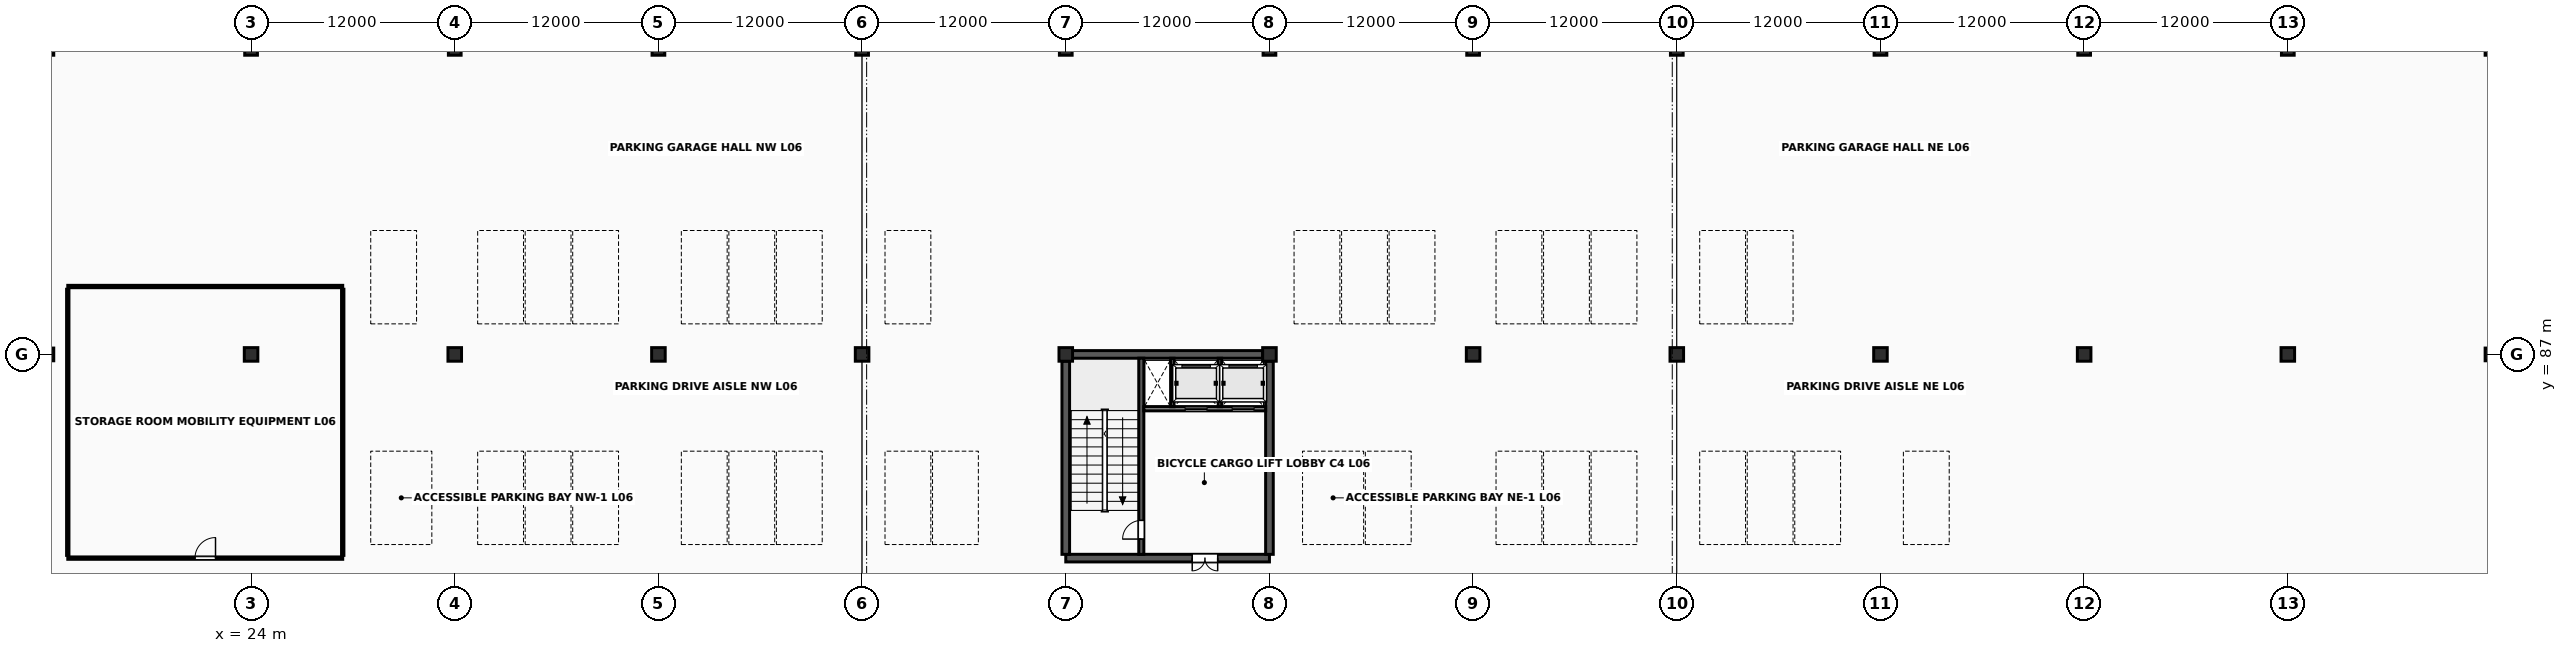
"""IFC4 building model, lengths in metres.
Left out: names, types, materials, properties, quantities, classifications, styles, units other than length and angle.
Written with IfcOpenShell. Run it as: python <this file> out.ifc"""

import sys

from ifc_helpers import new_model, si_unit, direction, frame, frame_2d, origin, origin_2d, place, context, subcontext, project, spatial, rectangle, extrude, element, fill, save


model = new_model("IFC4")
c1 = context("Model", 3, precision=1e-05, world=origin(), true_north=direction((0.0, 1.0)))
c2 = subcontext(c1, "Body", "Model", "MODEL_VIEW")
j1 = project(units=[si_unit("LENGTHUNIT", "METRE"), si_unit("PLANEANGLEUNIT", "RADIAN")], contexts=[c1])
p1 = place(None, origin())
s1 = spatial("IfcSite", under=j1, at=p1, CompositionType="ELEMENT")
p2 = place(p1, origin())
s2 = spatial("IfcBuilding", under=s1, at=p2, CompositionType="ELEMENT")
p3 = place(p2, frame((0.0, 0.0, 24.8)))
s3 = spatial("IfcBuildingStorey", under=s2, at=p3, CompositionType="ELEMENT", Elevation=24.8)
for number, where, z_axis, x_axis in (
    (1, (12.0, 87.0, 0.0), (0.0, 0.0, 1.0), (1.0, 0.0, 0.0)),
    (2, (12.0, 105.0, 0.0), (0.0, 0.0, 1.0), (1.0, 0.0, 0.0)),
):
    element("IfcColumn", number, at=place(p3, frame(where, z_axis=z_axis, x_axis=x_axis)), inside=s3, PredefinedType="COLUMN", context=c2, shape_type="SweptSolid", body=[
        extrude(rectangle(XDim=0.75, YDim=0.75, at=origin_2d()), origin(), (0.0, 0.0, 1.0), 3.8),
    ])
p4 = place(p3, frame((24.0, 87.0, 0.0), z_axis=(0.0, 0.0, 1.0), x_axis=(1.0, 0.0, 0.0)))
e3 = element("IfcColumn", 3, at=p4, inside=s3, PredefinedType="COLUMN", context=c2, shape_type="SweptSolid", body=[
    extrude(rectangle(XDim=0.8, YDim=0.8, at=origin_2d()), origin(), (0.0, 0.0, 1.0), 3.8),
])
p5 = place(p3, frame((24.0, 105.0, 0.0), z_axis=(0.0, 0.0, 1.0), x_axis=(1.0, 0.0, 0.0)))
e4 = element("IfcColumn", 4, at=p5, inside=s3, PredefinedType="COLUMN", context=c2, shape_type="SweptSolid", body=[
    extrude(rectangle(XDim=0.75, YDim=0.75, at=origin_2d()), origin(), (0.0, 0.0, 1.0), 3.8),
])
p6 = place(p3, frame((36.0, 87.0, 0.0), z_axis=(0.0, 0.0, 1.0), x_axis=(1.0, 0.0, 0.0)))
e5 = element("IfcColumn", 5, at=p6, inside=s3, PredefinedType="COLUMN", context=c2, shape_type="SweptSolid", body=[
    extrude(rectangle(XDim=0.8, YDim=0.8, at=origin_2d()), origin(), (0.0, 0.0, 1.0), 3.8),
])
p7 = place(p3, frame((36.0, 105.0, 0.0), z_axis=(0.0, 0.0, 1.0), x_axis=(1.0, 0.0, 0.0)))
e6 = element("IfcColumn", 6, at=p7, inside=s3, PredefinedType="COLUMN", context=c2, shape_type="SweptSolid", body=[
    extrude(rectangle(XDim=0.75, YDim=0.75, at=origin_2d()), origin(), (0.0, 0.0, 1.0), 3.8),
])
p8 = place(p3, frame((48.0, 87.0, 0.0), z_axis=(0.0, 0.0, 1.0), x_axis=(1.0, 0.0, 0.0)))
e7 = element("IfcColumn", 7, at=p8, inside=s3, PredefinedType="COLUMN", context=c2, shape_type="SweptSolid", body=[
    extrude(rectangle(XDim=0.8, YDim=0.8, at=origin_2d()), origin(), (0.0, 0.0, 1.0), 3.8),
])
p9 = place(p3, frame((48.0, 105.0, 0.0), z_axis=(0.0, 0.0, 1.0), x_axis=(1.0, 0.0, 0.0)))
e8 = element("IfcColumn", 8, at=p9, inside=s3, PredefinedType="COLUMN", context=c2, shape_type="SweptSolid", body=[
    extrude(rectangle(XDim=0.75, YDim=0.75, at=origin_2d()), origin(), (0.0, 0.0, 1.0), 3.8),
])
p10 = place(p3, frame((60.0, 87.0, 0.0), z_axis=(0.0, 0.0, 1.0), x_axis=(1.0, 0.0, 0.0)))
e9 = element("IfcColumn", 9, at=p10, inside=s3, PredefinedType="COLUMN", context=c2, shape_type="SweptSolid", body=[
    extrude(rectangle(XDim=0.8, YDim=0.8, at=origin_2d()), origin(), (0.0, 0.0, 1.0), 3.8),
])
p11 = place(p3, frame((60.0, 105.0, 0.0), z_axis=(0.0, 0.0, 1.0), x_axis=(1.0, 0.0, 0.0)))
e10 = element("IfcColumn", 10, at=p11, inside=s3, PredefinedType="COLUMN", context=c2, shape_type="SweptSolid", body=[
    extrude(rectangle(XDim=0.75, YDim=0.75, at=origin_2d()), origin(), (0.0, 0.0, 1.0), 3.8),
])
p12 = place(p3, frame((72.0, 87.0, 0.0), z_axis=(0.0, 0.0, 1.0), x_axis=(1.0, 0.0, 0.0)))
e11 = element("IfcColumn", 11, at=p12, inside=s3, PredefinedType="COLUMN", context=c2, shape_type="SweptSolid", body=[
    extrude(rectangle(XDim=0.8, YDim=0.8, at=origin_2d()), origin(), (0.0, 0.0, 1.0), 3.8),
])
p13 = place(p3, frame((72.0, 105.0, 0.0), z_axis=(0.0, 0.0, 1.0), x_axis=(1.0, 0.0, 0.0)))
e12 = element("IfcColumn", 12, at=p13, inside=s3, PredefinedType="COLUMN", context=c2, shape_type="SweptSolid", body=[
    extrude(rectangle(XDim=0.75, YDim=0.75, at=origin_2d()), origin(), (0.0, 0.0, 1.0), 3.8),
])
p14 = place(p3, frame((84.0, 87.0, 0.0), z_axis=(0.0, 0.0, 1.0), x_axis=(1.0, 0.0, 0.0)))
e13 = element("IfcColumn", 13, at=p14, inside=s3, PredefinedType="COLUMN", context=c2, shape_type="SweptSolid", body=[
    extrude(rectangle(XDim=0.8, YDim=0.8, at=origin_2d()), origin(), (0.0, 0.0, 1.0), 3.8),
])
p15 = place(p3, frame((84.0, 105.0, 0.0), z_axis=(0.0, 0.0, 1.0), x_axis=(1.0, 0.0, 0.0)))
e14 = element("IfcColumn", 14, at=p15, inside=s3, PredefinedType="COLUMN", context=c2, shape_type="SweptSolid", body=[
    extrude(rectangle(XDim=0.75, YDim=0.75, at=origin_2d()), origin(), (0.0, 0.0, 1.0), 3.8),
])
p16 = place(p3, frame((96.0, 87.0, 0.0), z_axis=(0.0, 0.0, 1.0), x_axis=(1.0, 0.0, 0.0)))
e15 = element("IfcColumn", 15, at=p16, inside=s3, PredefinedType="COLUMN", context=c2, shape_type="SweptSolid", body=[
    extrude(rectangle(XDim=0.8, YDim=0.8, at=origin_2d()), origin(), (0.0, 0.0, 1.0), 3.8),
])
p17 = place(p3, frame((96.0, 105.0, 0.0), z_axis=(0.0, 0.0, 1.0), x_axis=(1.0, 0.0, 0.0)))
e16 = element("IfcColumn", 16, at=p17, inside=s3, PredefinedType="COLUMN", context=c2, shape_type="SweptSolid", body=[
    extrude(rectangle(XDim=0.75, YDim=0.75, at=origin_2d()), origin(), (0.0, 0.0, 1.0), 3.8),
])
p18 = place(p3, frame((108.0, 87.0, 0.0), z_axis=(0.0, 0.0, 1.0), x_axis=(1.0, 0.0, 0.0)))
e17 = element("IfcColumn", 17, at=p18, inside=s3, PredefinedType="COLUMN", context=c2, shape_type="SweptSolid", body=[
    extrude(rectangle(XDim=0.8, YDim=0.8, at=origin_2d()), origin(), (0.0, 0.0, 1.0), 3.8),
])
p19 = place(p3, frame((108.0, 105.0, 0.0), z_axis=(0.0, 0.0, 1.0), x_axis=(1.0, 0.0, 0.0)))
e18 = element("IfcColumn", 18, at=p19, inside=s3, PredefinedType="COLUMN", context=c2, shape_type="SweptSolid", body=[
    extrude(rectangle(XDim=0.75, YDim=0.75, at=origin_2d()), origin(), (0.0, 0.0, 1.0), 3.8),
])
p20 = place(p3, frame((120.0, 87.0, 0.0), z_axis=(0.0, 0.0, 1.0), x_axis=(1.0, 0.0, 0.0)))
e19 = element("IfcColumn", 19, at=p20, inside=s3, PredefinedType="COLUMN", context=c2, shape_type="SweptSolid", body=[
    extrude(rectangle(XDim=0.8, YDim=0.8, at=origin_2d()), origin(), (0.0, 0.0, 1.0), 3.8),
])
p21 = place(p3, frame((120.0, 105.0, 0.0), z_axis=(0.0, 0.0, 1.0), x_axis=(1.0, 0.0, 0.0)))
e20 = element("IfcColumn", 20, at=p21, inside=s3, PredefinedType="COLUMN", context=c2, shape_type="SweptSolid", body=[
    extrude(rectangle(XDim=0.75, YDim=0.75, at=origin_2d()), origin(), (0.0, 0.0, 1.0), 3.8),
])
p22 = place(p3, frame((132.0, 87.0, 0.0), z_axis=(0.0, 0.0, 1.0), x_axis=(1.0, 0.0, 0.0)))
e21 = element("IfcColumn", 21, at=p22, inside=s3, PredefinedType="COLUMN", context=c2, shape_type="SweptSolid", body=[
    extrude(rectangle(XDim=0.8, YDim=0.8, at=origin_2d()), origin(), (0.0, 0.0, 1.0), 3.8),
])
p23 = place(p3, frame((132.0, 105.0, 0.0), z_axis=(0.0, 0.0, 1.0), x_axis=(1.0, 0.0, 0.0)))
e22 = element("IfcColumn", 22, at=p23, inside=s3, PredefinedType="COLUMN", context=c2, shape_type="SweptSolid", body=[
    extrude(rectangle(XDim=0.75, YDim=0.75, at=origin_2d()), origin(), (0.0, 0.0, 1.0), 3.8),
])
p24 = place(p3, frame((144.0, 87.0, 0.0), z_axis=(0.0, 0.0, 1.0), x_axis=(1.0, 0.0, 0.0)))
e23 = element("IfcColumn", 23, at=p24, inside=s3, PredefinedType="COLUMN", context=c2, shape_type="SweptSolid", body=[
    extrude(rectangle(XDim=0.8, YDim=0.8, at=origin_2d()), origin(), (0.0, 0.0, 1.0), 3.8),
])
for number, where, z_axis, x_axis in (
    (24, (144.0, 105.0, 0.0), (0.0, 0.0, 1.0), (1.0, 0.0, 0.0)),
    (25, (156.0, 87.0, 0.0), (0.0, 0.0, 1.0), (1.0, 0.0, 0.0)),
    (26, (156.0, 105.0, 0.0), (0.0, 0.0, 1.0), (1.0, 0.0, 0.0)),
):
    element("IfcColumn", number, at=place(p3, frame(where, z_axis=z_axis, x_axis=x_axis)), inside=s3, PredefinedType="COLUMN", context=c2, shape_type="SweptSolid", body=[
        extrude(rectangle(XDim=0.75, YDim=0.75, at=origin_2d()), origin(), (0.0, 0.0, 1.0), 3.8),
    ])
p25 = place(p3, frame((72.0, 75.0, 0.0), z_axis=(0.0, 0.0, 1.0), x_axis=(1.0, 0.0, 0.0)))
e27 = element("IfcWall", 27, at=p25, inside=s3, PredefinedType="SHEAR", context=c2, shape_type="SweptSolid", body=[
    extrude(rectangle(XDim=12.0, YDim=0.45, at=frame_2d((6.0, 0.0))), origin(), (0.0, 0.0, 1.0), 3.628),
])
p26 = place(p25, frame((7.45, 0.0, 0.0)))
e28 = element("IfcOpeningElement", 28, at=p26, cuts=e27, PredefinedType="OPENING", context=c2, shape_type="SweptSolid", body=[
    extrude(rectangle(XDim=1.5, YDim=2.25, at=frame_2d((0.75, 1.125))), frame((0.0, 0.24, 0.0), z_axis=(0.0, -1.0, 0.0), x_axis=(1.0, 0.0, 0.0)), (0.0, 0.0, 1.0), 0.48),
])
p27 = place(p3, frame((72.397, 87.0, 0.0), z_axis=(0.0, 0.0, 1.0), x_axis=(1.0, 0.0, 0.0)))
e29 = element("IfcWall", 29, at=p27, inside=s3, PredefinedType="SHEAR", context=c2, shape_type="SweptSolid", body=[
    extrude(rectangle(XDim=11.206, YDim=0.45, at=frame_2d((5.603, 0.0))), origin(), (0.0, 0.0, 1.0), 3.628),
])
for number, where, z_axis, x_axis in (
    (30, (72.0, 75.222, 0.0), (0.0, 0.0, 1.0), (0.0, 1.0, 0.0)),
    (31, (84.0, 75.222, 0.0), (0.0, 0.0, 1.0), (0.0, 1.0, 0.0)),
):
    element("IfcWall", number, at=place(p3, frame(where, z_axis=z_axis, x_axis=x_axis)), inside=s3, PredefinedType="SHEAR", context=c2, shape_type="SweptSolid", body=[
        extrude(rectangle(XDim=11.381, YDim=0.45, at=frame_2d((5.69, 0.0))), origin(), (0.0, 0.0, 1.0), 3.628),
    ])
p28 = place(p3, frame((76.45, 75.222, 0.0), z_axis=(0.0, 0.0, 1.0), x_axis=(0.0, 1.0, 0.0)))
e32 = element("IfcWall", 32, at=p28, inside=s3, PredefinedType="SHEAR", context=c2, shape_type="SweptSolid", body=[
    extrude(rectangle(XDim=11.556, YDim=0.3, at=frame_2d((5.778, 0.0))), origin(), (0.0, 0.0, 1.0), 3.628),
])
p29 = place(p28, frame((0.9, 0.0, 0.0)))
e33 = element("IfcOpeningElement", 33, at=p29, cuts=e32, PredefinedType="OPENING", context=c2, shape_type="SweptSolid", body=[
    extrude(rectangle(XDim=1.1, YDim=2.2, at=frame_2d((0.55, 1.1))), frame((0.0, 0.165, 0.0), z_axis=(0.0, -1.0, 0.0), x_axis=(1.0, 0.0, 0.0)), (0.0, 0.0, 1.0), 0.33),
])
p30 = place(p3, frame((76.597, 83.8, 0.0), z_axis=(0.0, 0.0, 1.0), x_axis=(1.0, 0.0, 0.0)))
e34 = element("IfcWall", 34, at=p30, inside=s3, PredefinedType="SOLIDWALL", context=c2, shape_type="SweptSolid", body=[
    extrude(rectangle(XDim=7.181, YDim=0.25, at=frame_2d((3.591, 0.0))), origin(), (0.0, 0.0, 1.0), 3.628),
])
p31 = place(p30, frame((2.433, 0.0, 0.0)))
e35 = element("IfcOpeningElement", 35, at=p31, cuts=e34, PredefinedType="OPENING", context=c2, shape_type="SweptSolid", body=[
    extrude(rectangle(XDim=1.3, YDim=2.28, at=frame_2d((0.65, 1.14))), frame((0.0, 0.14, 0.0), z_axis=(0.0, -1.0, 0.0), x_axis=(1.0, 0.0, 0.0)), (0.0, 0.0, 1.0), 0.28),
])
p32 = place(p30, frame((5.203, 0.0, 0.0)))
e36 = element("IfcOpeningElement", 36, at=p32, cuts=e34, PredefinedType="OPENING", context=c2, shape_type="SweptSolid", body=[
    extrude(rectangle(XDim=1.3, YDim=2.28, at=frame_2d((0.65, 1.14))), frame((0.0, 0.14, 0.0), z_axis=(0.0, -1.0, 0.0), x_axis=(1.0, 0.0, 0.0)), (0.0, 0.0, 1.0), 0.28),
])
for number, where, z_axis, x_axis in (
    (37, (78.28, 83.92, 0.0), (0.0, 0.0, 1.0), (0.0, 1.0, 0.0)),
    (38, (81.08, 83.92, 0.0), (0.0, 0.0, 1.0), (0.0, 1.0, 0.0)),
):
    element("IfcWall", number, at=place(p3, frame(where, z_axis=z_axis, x_axis=x_axis)), inside=s3, PredefinedType="SOLIDWALL", context=c2, shape_type="SweptSolid", body=[
        extrude(rectangle(XDim=2.855, YDim=0.2, at=frame_2d((1.427, 0.0))), origin(), (0.0, 0.0, 1.0), 3.618),
    ])
p33 = place(p3, frame((13.2, 75.0, 0.0), z_axis=(0.0, 0.0, 1.0), x_axis=(1.0, 0.0, 0.0)))
e39 = element("IfcWall", 39, at=p33, inside=s3, PredefinedType="PARTITIONING", context=c2, shape_type="SweptSolid", body=[
    extrude(rectangle(XDim=16.2, YDim=0.14, at=frame_2d((8.1, 0.0))), origin(), (0.0, 0.0, 1.0), 2.75),
])
p34 = place(p33, frame((7.495, 0.0, 0.0)))
e40 = element("IfcOpeningElement", 40, at=p34, cuts=e39, PredefinedType="OPENING", context=c2, shape_type="SweptSolid", body=[
    extrude(rectangle(XDim=1.21, YDim=2.25, at=frame_2d((0.605, 1.125))), frame((0.0, 0.085, 0.0), z_axis=(0.0, -1.0, 0.0), x_axis=(1.0, 0.0, 0.0)), (0.0, 0.0, 1.0), 0.17),
])
p35 = place(p3, frame((13.2, 91.0, 0.0), z_axis=(0.0, 0.0, 1.0), x_axis=(1.0, 0.0, 0.0)))
e41 = element("IfcWall", 41, at=p35, inside=s3, PredefinedType="PARTITIONING", context=c2, shape_type="SweptSolid", body=[
    extrude(rectangle(XDim=16.2, YDim=0.14, at=frame_2d((8.1, 0.0))), origin(), (0.0, 0.0, 1.0), 2.75),
])
for number, where, z_axis, x_axis in (
    (42, (13.2, 75.16, 0.0), (0.0, 0.0, 1.0), (0.0, 1.0, 0.0)),
    (43, (29.4, 75.16, 0.0), (0.0, 0.0, 1.0), (0.0, 1.0, 0.0)),
):
    element("IfcWall", number, at=place(p3, frame(where, z_axis=z_axis, x_axis=x_axis)), inside=s3, PredefinedType="PARTITIONING", context=c2, shape_type="SweptSolid", body=[
        extrude(rectangle(XDim=15.68, YDim=0.14, at=frame_2d((7.84, 0.0))), origin(), (0.0, 0.0, 1.0), 2.75),
    ])
p36 = place(p29, origin())
e44 = element("IfcDoor", 44, at=p36, inside=s3, OperationType="SINGLE_SWING_LEFT", PredefinedType="DOOR", context=c2, shape_type="SweptSolid", body=[
    extrude(rectangle(XDim=1.1, YDim=2.2, at=frame_2d((0.55, 1.1))), frame((0.0, 0.025, 0.0), z_axis=(0.0, -1.0, 0.0), x_axis=(1.0, 0.0, 0.0)), (0.0, 0.0, 1.0), 0.05),
])
fill(e33, e44)
p37 = place(p26, origin())
e45 = element("IfcDoor", 45, at=p37, inside=s3, OperationType="DOUBLE_DOOR_SINGLE_SWING", PredefinedType="DOOR", context=c2, shape_type="SweptSolid", body=[
    extrude(rectangle(XDim=1.5, YDim=2.25, at=frame_2d((0.75, 1.125))), frame((0.0, 0.025, 0.0), z_axis=(0.0, -1.0, 0.0), x_axis=(1.0, 0.0, 0.0)), (0.0, 0.0, 1.0), 0.05),
])
fill(e28, e45)
p38 = place(p31, origin())
e46 = element("IfcDoor", 46, at=p38, inside=s3, OperationType="SLIDING_TO_LEFT", PredefinedType="USERDEFINED", context=c2, shape_type="SweptSolid", body=[
    extrude(rectangle(XDim=1.3, YDim=2.28, at=frame_2d((0.65, 1.14))), frame((0.0, 0.025, 0.0), z_axis=(0.0, -1.0, 0.0), x_axis=(1.0, 0.0, 0.0)), (0.0, 0.0, 1.0), 0.05),
])
fill(e35, e46)
p39 = place(p32, origin())
e47 = element("IfcDoor", 47, at=p39, inside=s3, OperationType="SLIDING_TO_LEFT", PredefinedType="USERDEFINED", context=c2, shape_type="SweptSolid", body=[
    extrude(rectangle(XDim=1.3, YDim=2.28, at=frame_2d((0.65, 1.14))), frame((0.0, 0.025, 0.0), z_axis=(0.0, -1.0, 0.0), x_axis=(1.0, 0.0, 0.0)), (0.0, 0.0, 1.0), 0.05),
])
fill(e36, e47)
p40 = place(p34, origin())
e48 = element("IfcDoor", 48, at=p40, inside=s3, OperationType="SINGLE_SWING_RIGHT", PredefinedType="DOOR", context=c2, shape_type="SweptSolid", body=[
    extrude(rectangle(XDim=1.21, YDim=2.25, at=frame_2d((0.605, 1.125))), frame((0.0, 0.025, 0.0), z_axis=(0.0, -1.0, 0.0), x_axis=(1.0, 0.0, 0.0)), (0.0, 0.0, 1.0), 0.05),
])
fill(e40, e48)
save(model, sys.argv[1])
